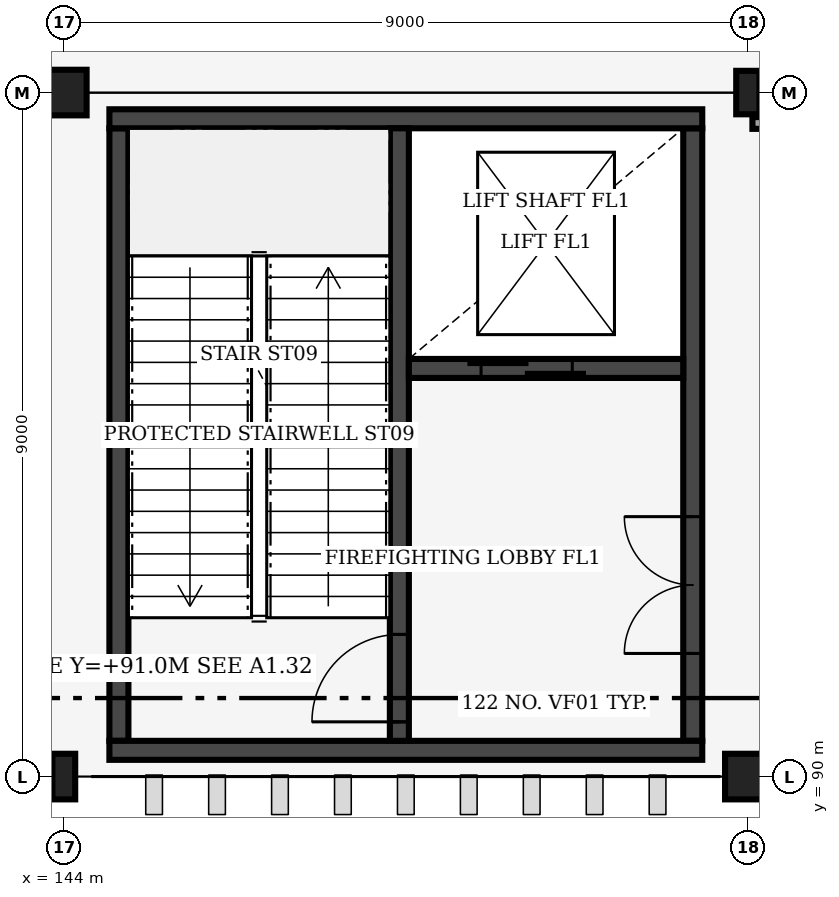
"""IFC4 building model, lengths in metres.
Left out: names, types, materials, properties, quantities, classifications, styles, units other than length and angle.
Written with IfcOpenShell. Run it as: python <this file> out.ifc"""

import sys

from ifc_helpers import new_model, si_unit, direction, frame, frame_2d, origin, origin_2d, place, context, subcontext, project, spatial, rectangle, i_section, extrude, element, fill, save


model = new_model("IFC4")
c1 = context("Model", 3, precision=1e-05, world=origin(), true_north=direction((0.0, 1.0)))
c2 = subcontext(c1, "Body", "Model", "MODEL_VIEW")
j1 = project(units=[si_unit("LENGTHUNIT", "METRE"), si_unit("PLANEANGLEUNIT", "RADIAN")], contexts=[c1])
p1 = place(None, origin())
s1 = spatial("IfcSite", under=j1, at=p1, CompositionType="ELEMENT")
p2 = place(p1, origin())
s2 = spatial("IfcBuilding", under=s1, at=p2, CompositionType="ELEMENT")
p3 = place(p2, frame((0.0, 0.0, 6.0)))
s3 = spatial("IfcBuildingStorey", under=s2, at=p3, CompositionType="ELEMENT", Elevation=6.0)
p4 = place(p3, frame((144.0, 90.0, 0.0), z_axis=(0.0, 0.0, 1.0), x_axis=(1.0, 0.0, 0.0)))
e1 = element("IfcColumn", 1, at=p4, inside=s3, PredefinedType="COLUMN", context=c2, shape_type="SweptSolid", body=[
    extrude(i_section(OverallWidth=0.3, OverallDepth=0.6, WebThickness=0.015, FlangeThickness=0.03, FilletRadius=0.027, at=origin_2d()), origin(), (0.0, 0.0, 1.0), 6.0),
])
for number, where, z_axis, x_axis in (
    (2, (144.0, 99.0, 0.0), (0.0, 0.0, 1.0), (1.0, 0.0, 0.0)),
    (3, (153.0, 90.0, 0.0), (0.0, 0.0, 1.0), (1.0, 0.0, 0.0)),
):
    element("IfcColumn", number, at=place(p3, frame(where, z_axis=z_axis, x_axis=x_axis)), inside=s3, PredefinedType="COLUMN", context=c2, shape_type="SweptSolid", body=[
        extrude(rectangle(XDim=0.6, YDim=0.6, at=origin_2d()), origin(), (0.0, 0.0, 1.0), 6.0),
    ])
p5 = place(p3, frame((153.0, 99.0, 0.0), z_axis=(0.0, 0.0, 1.0), x_axis=(1.0, 0.0, 0.0)))
e4 = element("IfcColumn", 4, at=p5, inside=s3, PredefinedType="COLUMN", context=c2, shape_type="SweptSolid", body=[
    extrude(i_section(OverallWidth=0.306, OverallDepth=0.572, WebThickness=0.021, FlangeThickness=0.04, FilletRadius=0.027, at=origin_2d()), origin(), (0.0, 0.0, 1.0), 6.0),
])
p6 = place(p3, frame((144.725, 90.47, 0.0), z_axis=(0.0, 0.0, 1.0), x_axis=(0.0, 1.0, 0.0)))
e5 = element("IfcWall", 5, at=p6, inside=s3, PredefinedType="SHEAR", context=c2, shape_type="SweptSolid", body=[
    extrude(rectangle(XDim=8.06, YDim=0.25, at=frame_2d((4.03, 0.0))), origin(), (0.0, 0.0, 1.0), 5.64),
])
p7 = place(p3, frame((152.275, 90.47, 0.0), z_axis=(0.0, 0.0, 1.0), x_axis=(0.0, 1.0, 0.0)))
e6 = element("IfcWall", 6, at=p7, inside=s3, PredefinedType="SHEAR", context=c2, shape_type="SweptSolid", body=[
    extrude(rectangle(XDim=8.06, YDim=0.25, at=frame_2d((4.03, 0.0))), origin(), (0.0, 0.0, 1.0), 5.64),
])
p8 = place(p7, frame((1.15, 0.0, 0.0)))
e7 = element("IfcOpeningElement", 7, at=p8, cuts=e6, PredefinedType="OPENING", context=c2, shape_type="SweptSolid", body=[
    extrude(rectangle(XDim=1.8, YDim=2.2, at=frame_2d((0.9, 1.1))), frame((0.0, 0.135, 0.0), z_axis=(0.0, -1.0, 0.0), x_axis=(1.0, 0.0, 0.0)), (0.0, 0.0, 1.0), 0.27),
])
for number, where, z_axis, x_axis in (
    (8, (144.6, 90.345, 0.0), (0.0, 0.0, 1.0), (1.0, 0.0, 0.0)),
    (9, (144.6, 98.655, 0.0), (0.0, 0.0, 1.0), (1.0, 0.0, 0.0)),
):
    element("IfcWall", number, at=place(p3, frame(where, z_axis=z_axis, x_axis=x_axis)), inside=s3, PredefinedType="SHEAR", context=c2, shape_type="SweptSolid", body=[
        extrude(rectangle(XDim=7.8, YDim=0.25, at=frame_2d((3.9, 0.0))), origin(), (0.0, 0.0, 1.0), 5.64),
    ])
p9 = place(p3, frame((148.415, 90.47, 0.0), z_axis=(0.0, 0.0, 1.0), x_axis=(0.0, 1.0, 0.0)))
e10 = element("IfcWall", 10, at=p9, inside=s3, PredefinedType="SHEAR", context=c2, shape_type="SweptSolid", body=[
    extrude(rectangle(XDim=8.06, YDim=0.25, at=frame_2d((4.03, 0.0))), origin(), (0.0, 0.0, 1.0), 5.64),
])
p10 = place(p9, frame((0.25, 0.0, 0.0)))
e11 = element("IfcOpeningElement", 11, at=p10, cuts=e10, PredefinedType="OPENING", context=c2, shape_type="SweptSolid", body=[
    extrude(rectangle(XDim=1.15, YDim=2.15, at=frame_2d((0.575, 1.075))), frame((0.0, 0.135, 0.0), z_axis=(0.0, -1.0, 0.0), x_axis=(1.0, 0.0, 0.0)), (0.0, 0.0, 1.0), 0.27),
])
p11 = place(p3, frame((148.54, 95.37, 0.0), z_axis=(0.0, 0.0, 1.0), x_axis=(1.0, 0.0, 0.0)))
e12 = element("IfcWall", 12, at=p11, inside=s3, PredefinedType="SHEAR", context=c2, shape_type="SweptSolid", body=[
    extrude(rectangle(XDim=3.61, YDim=0.25, at=frame_2d((1.805, 0.0))), origin(), (0.0, 0.0, 1.0), 5.64),
])
p12 = place(p11, frame((0.95, 0.0, 0.0)))
e13 = element("IfcOpeningElement", 13, at=p12, cuts=e12, PredefinedType="OPENING", context=c2, shape_type="SweptSolid", body=[
    extrude(rectangle(XDim=1.2, YDim=2.2, at=frame_2d((0.6, 1.1))), frame((0.0, 0.135, 0.0), z_axis=(0.0, -1.0, 0.0), x_axis=(1.0, 0.0, 0.0)), (0.0, 0.0, 1.0), 0.27),
])
p13 = place(p3, frame((153.06, 98.6, 0.0), z_axis=(0.0, 0.0, 1.0), x_axis=(1.0, 0.0, 0.0)))
e14 = element("IfcWall", 14, at=p13, inside=s3, PredefinedType="PARTITIONING", context=c2, shape_type="SweptSolid", body=[
    extrude(rectangle(XDim=16.04, YDim=0.155, at=frame_2d((8.02, 0.0))), origin(), (0.0, 0.0, 1.0), 4.85),
])
p14 = place(p13, frame((1.15, 0.0, 0.0)))
e15 = element("IfcOpeningElement", 15, at=p14, cuts=e14, PredefinedType="OPENING", context=c2, shape_type="SweptSolid", body=[
    extrude(rectangle(XDim=1.75, YDim=2.3, at=frame_2d((0.875, 1.15))), frame((0.0, 0.087, 0.0), z_axis=(0.0, -1.0, 0.0), x_axis=(1.0, 0.0, 0.0)), (0.0, 0.0, 1.0), 0.175),
])
p15 = place(p10, origin())
e16 = element("IfcDoor", 16, at=p15, inside=s3, OperationType="SINGLE_SWING_LEFT", PredefinedType="DOOR", context=c2, shape_type="SweptSolid", body=[
    extrude(rectangle(XDim=1.15, YDim=2.15, at=frame_2d((0.575, 1.075))), frame((0.0, 0.025, 0.0), z_axis=(0.0, -1.0, 0.0), x_axis=(1.0, 0.0, 0.0)), (0.0, 0.0, 1.0), 0.05),
])
fill(e11, e16)
p16 = place(p12, origin())
e17 = element("IfcDoor", 17, at=p16, inside=s3, OperationType="DOUBLE_DOOR_SLIDING", PredefinedType="DOOR", context=c2, shape_type="SweptSolid", body=[
    extrude(rectangle(XDim=1.2, YDim=2.2, at=frame_2d((0.6, 1.1))), frame((0.0, 0.025, 0.0), z_axis=(0.0, -1.0, 0.0), x_axis=(1.0, 0.0, 0.0)), (0.0, 0.0, 1.0), 0.05),
])
fill(e13, e17)
p17 = place(p8, origin())
e18 = element("IfcDoor", 18, at=p17, inside=s3, OperationType="DOUBLE_DOOR_SINGLE_SWING", PredefinedType="DOOR", context=c2, shape_type="SweptSolid", body=[
    extrude(rectangle(XDim=1.8, YDim=2.2, at=frame_2d((0.9, 1.1))), frame((0.0, 0.025, 0.0), z_axis=(0.0, -1.0, 0.0), x_axis=(1.0, 0.0, 0.0)), (0.0, 0.0, 1.0), 0.05),
])
fill(e7, e18)
save(model, sys.argv[1])
